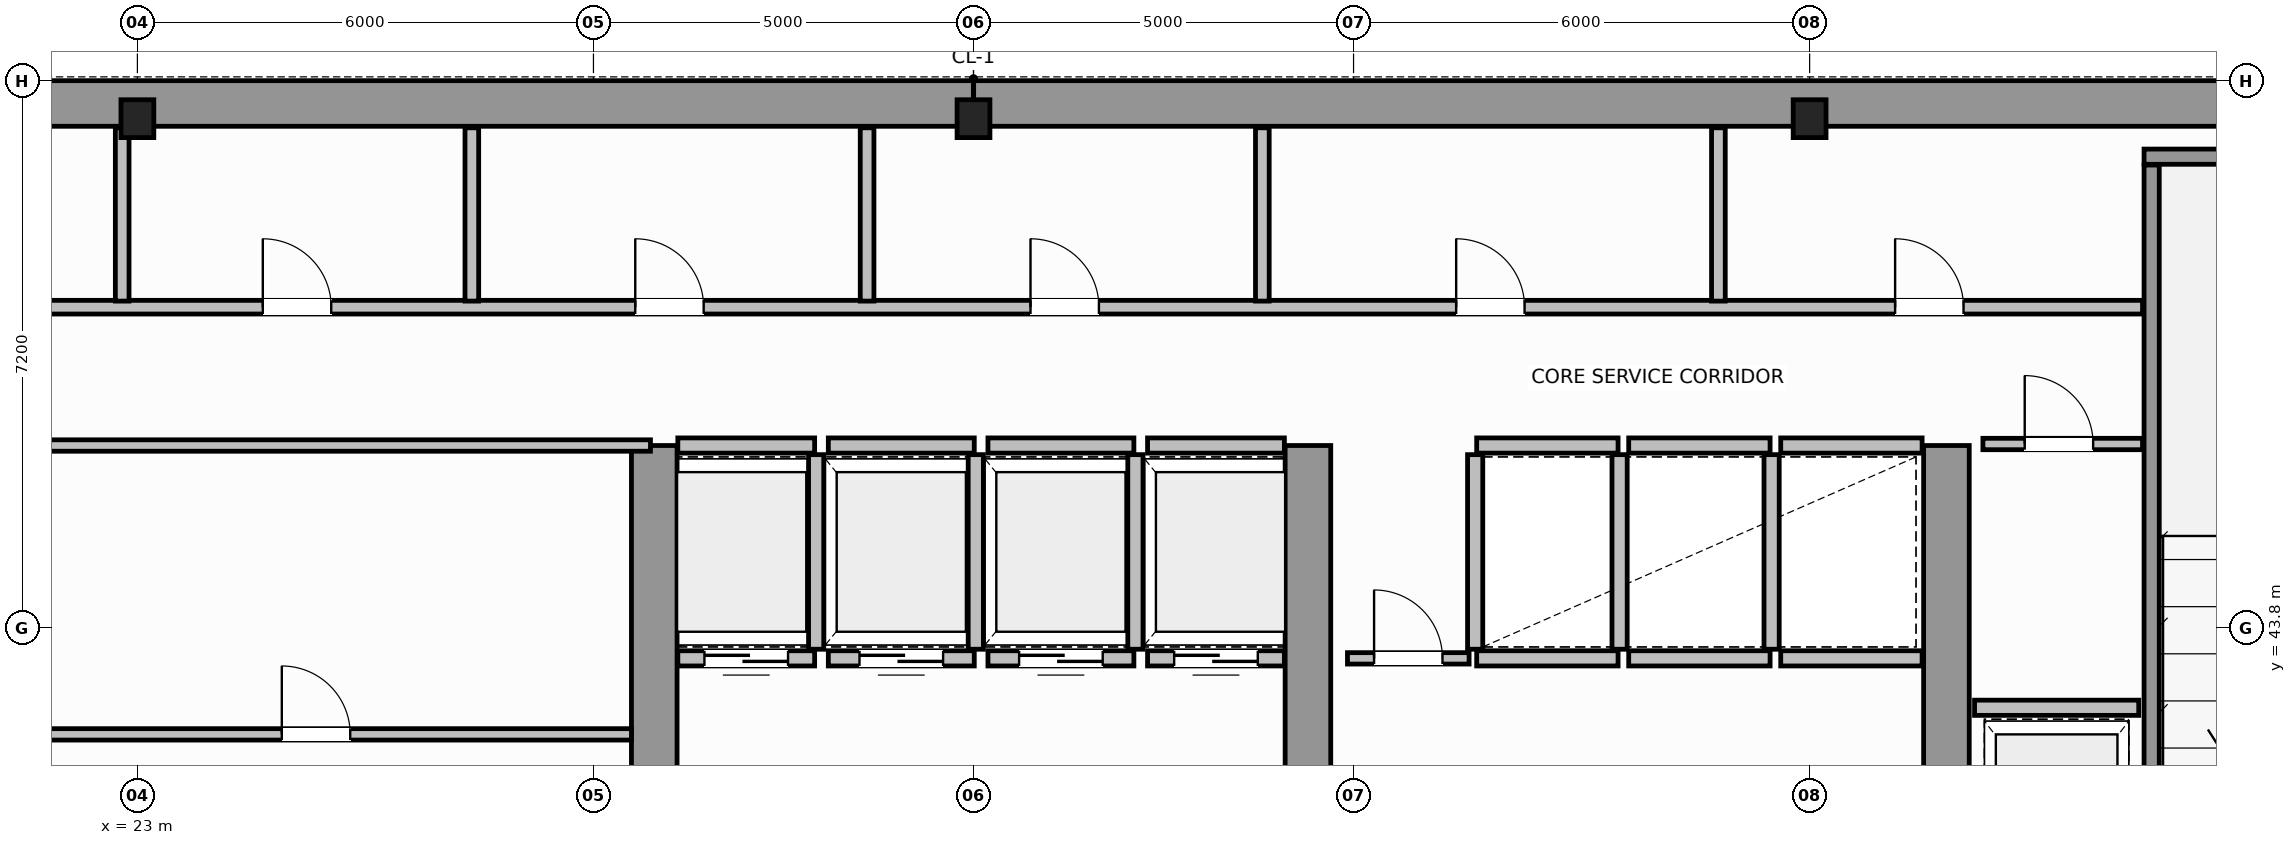
"""IFC4 building model, lengths in metres.
Left out: names, types, materials, properties, quantities, classifications, styles, units other than length and angle.
Written with IfcOpenShell. Run it as: python <this file> out.ifc"""

import sys

from ifc_helpers import new_model, si_unit, direction, frame, frame_2d, origin, origin_2d, place, context, subcontext, project, spatial, rectangle, i_section, extrude, source, transform, mapped, element, fill, save


model = new_model("IFC4")
c1 = context("Model", 3, precision=1e-05, world=origin(), true_north=direction((0.0, 1.0)))
c2 = subcontext(c1, "Body", "Model", "MODEL_VIEW")
j1 = project(units=[si_unit("LENGTHUNIT", "METRE"), si_unit("PLANEANGLEUNIT", "RADIAN")], contexts=[c1])
p1 = place(None, origin())
s1 = spatial("IfcSite", under=j1, at=p1, CompositionType="ELEMENT")
p2 = place(p1, origin())
s2 = spatial("IfcBuilding", under=s1, at=p2, CompositionType="ELEMENT")
p3 = place(p2, frame((0.0, 0.0, 172.8)))
s3 = spatial("IfcBuildingStorey", under=s2, at=p3, CompositionType="ELEMENT", Elevation=172.8)
m1 = source(origin(), c2, "Body", "SweptSolid", [
    extrude(i_section(OverallWidth=0.432, OverallDepth=0.498, WebThickness=0.055, FlangeThickness=0.068, FilletRadius=0.015, at=origin_2d()), origin(), (0.0, 0.0, 1.0), 3.8),
])
for number, where, z_axis, x_axis in (
    (1, (23.0, 50.5, 0.0), (0.0, 0.0, 1.0), (1.0, 0.0, 0.0)),
    (2, (34.0, 50.5, 0.0), (0.0, 0.0, 1.0), (1.0, 0.0, 0.0)),
    (3, (45.0, 50.5, 0.0), (0.0, 0.0, 1.0), (1.0, 0.0, 0.0)),
):
    element("IfcColumn", number, at=place(p3, frame(where, z_axis=z_axis, x_axis=x_axis)), inside=s3, PredefinedType="COLUMN", context=c2, shape_type="MappedRepresentation", body=[
        mapped(m1, transform((0.0, 0.0, 0.0), scale=1.0)),
    ])
for number, where, z_axis, x_axis in (
    (4, (14.304, 50.7, 0.0), (0.0, 0.0, 1.0), (1.0, 0.0, 0.0)),
    (5, (34.002, 50.7, 0.0), (0.0, 0.0, 1.0), (1.0, 0.0, 0.0)),
):
    element("IfcWall", number, at=place(p3, frame(where, z_axis=z_axis, x_axis=x_axis)), inside=s3, PredefinedType="SHEAR", context=c2, shape_type="SweptSolid", body=[
        extrude(rectangle(XDim=19.694, YDim=0.6, at=frame_2d((9.847, 0.0))), origin(), (0.0, 0.0, 1.0), 3.8),
    ])
for number, where, z_axis, x_axis in (
    (6, (29.8, 36.82, 0.0), (0.0, 0.0, 1.0), (0.0, 1.0, 0.0)),
    (7, (38.4, 36.82, 0.0), (0.0, 0.0, 1.0), (0.0, 1.0, 0.0)),
    (8, (46.8, 36.82, 0.0), (0.0, 0.0, 1.0), (0.0, 1.0, 0.0)),
):
    element("IfcWall", number, at=place(p3, frame(where, z_axis=z_axis, x_axis=x_axis)), inside=s3, PredefinedType="SHEAR", context=c2, shape_type="SweptSolid", body=[
        extrude(rectangle(XDim=9.38, YDim=0.6, at=frame_2d((4.69, 0.0))), origin(), (0.0, 0.0, 1.0), 3.8),
    ])
p4 = place(p3, frame((49.4, 50.0, 0.0), z_axis=(0.0, 0.0, 1.0), x_axis=(1.0, 0.0, 0.0)))
e9 = element("IfcWall", 9, at=p4, inside=s3, PredefinedType="SOLIDWALL", context=c2, shape_type="SweptSolid", body=[
    extrude(rectangle(XDim=4.3, YDim=0.2, at=frame_2d((2.15, 0.0))), origin(), (0.0, 0.0, 1.0), 3.8),
])
p5 = place(p3, frame((49.5, 39.96, 0.0), z_axis=(0.0, 0.0, 1.0), x_axis=(0.0, 1.0, 0.0)))
e10 = element("IfcWall", 10, at=p5, inside=s3, PredefinedType="SOLIDWALL", context=c2, shape_type="SweptSolid", body=[
    extrude(rectangle(XDim=9.93, YDim=0.2, at=frame_2d((4.965, 0.0))), origin(), (0.0, 0.0, 1.0), 3.8),
])
p6 = place(p3, frame((30.11, 43.4, 0.0), z_axis=(0.0, 0.0, 1.0), x_axis=(1.0, 0.0, 0.0)))
e11 = element("IfcWall", 11, at=p6, inside=s3, PredefinedType="SOLIDWALL", context=c2, shape_type="SweptSolid", body=[
    extrude(rectangle(XDim=1.8, YDim=0.2, at=frame_2d((0.9, 0.0))), origin(), (0.0, 0.0, 1.0), 3.58),
])
p7 = place(p6, frame((0.35, 0.0, 0.0)))
e12 = element("IfcOpeningElement", 12, at=p7, cuts=e11, PredefinedType="OPENING", context=c2, shape_type="SweptSolid", body=[
    extrude(rectangle(XDim=1.1, YDim=2.15, at=frame_2d((0.55, 1.075))), frame((0.0, 0.11, 0.0), z_axis=(0.0, -1.0, 0.0), x_axis=(1.0, 0.0, 0.0)), (0.0, 0.0, 1.0), 0.22),
])
p8 = place(p3, frame((30.11, 46.2, 0.0), z_axis=(0.0, 0.0, 1.0), x_axis=(1.0, 0.0, 0.0)))
e13 = element("IfcWall", 13, at=p8, inside=s3, PredefinedType="SOLIDWALL", context=c2, shape_type="SweptSolid", body=[
    extrude(rectangle(XDim=1.8, YDim=0.2, at=frame_2d((0.9, 0.0))), origin(), (0.0, 0.0, 1.0), 3.58),
])
p9 = place(p3, frame((31.93, 43.52, 0.0), z_axis=(0.0, 0.0, 1.0), x_axis=(0.0, 1.0, 0.0)))
e14 = element("IfcWall", 14, at=p9, inside=s3, PredefinedType="SOLIDWALL", context=c2, shape_type="SweptSolid", body=[
    extrude(rectangle(XDim=2.56, YDim=0.2, at=frame_2d((1.28, 0.0))), origin(), (0.0, 0.0, 1.0), 3.58),
])
p10 = place(p3, frame((32.09, 43.4, 0.0), z_axis=(0.0, 0.0, 1.0), x_axis=(1.0, 0.0, 0.0)))
e15 = element("IfcWall", 15, at=p10, inside=s3, PredefinedType="SOLIDWALL", context=c2, shape_type="SweptSolid", body=[
    extrude(rectangle(XDim=1.92, YDim=0.2, at=frame_2d((0.96, 0.0))), origin(), (0.0, 0.0, 1.0), 3.58),
])
p11 = place(p10, frame((0.41, 0.0, 0.0)))
e16 = element("IfcOpeningElement", 16, at=p11, cuts=e15, PredefinedType="OPENING", context=c2, shape_type="SweptSolid", body=[
    extrude(rectangle(XDim=1.1, YDim=2.15, at=frame_2d((0.55, 1.075))), frame((0.0, 0.11, 0.0), z_axis=(0.0, -1.0, 0.0), x_axis=(1.0, 0.0, 0.0)), (0.0, 0.0, 1.0), 0.22),
])
p12 = place(p3, frame((32.09, 46.2, 0.0), z_axis=(0.0, 0.0, 1.0), x_axis=(1.0, 0.0, 0.0)))
e17 = element("IfcWall", 17, at=p12, inside=s3, PredefinedType="SOLIDWALL", context=c2, shape_type="SweptSolid", body=[
    extrude(rectangle(XDim=1.92, YDim=0.2, at=frame_2d((0.96, 0.0))), origin(), (0.0, 0.0, 1.0), 3.58),
])
p13 = place(p3, frame((34.03, 43.52, 0.0), z_axis=(0.0, 0.0, 1.0), x_axis=(0.0, 1.0, 0.0)))
e18 = element("IfcWall", 18, at=p13, inside=s3, PredefinedType="SOLIDWALL", context=c2, shape_type="SweptSolid", body=[
    extrude(rectangle(XDim=2.56, YDim=0.2, at=frame_2d((1.28, 0.0))), origin(), (0.0, 0.0, 1.0), 3.58),
])
p14 = place(p3, frame((34.19, 43.4, 0.0), z_axis=(0.0, 0.0, 1.0), x_axis=(1.0, 0.0, 0.0)))
e19 = element("IfcWall", 19, at=p14, inside=s3, PredefinedType="SOLIDWALL", context=c2, shape_type="SweptSolid", body=[
    extrude(rectangle(XDim=1.92, YDim=0.2, at=frame_2d((0.96, 0.0))), origin(), (0.0, 0.0, 1.0), 3.58),
])
p15 = place(p14, frame((0.41, 0.0, 0.0)))
e20 = element("IfcOpeningElement", 20, at=p15, cuts=e19, PredefinedType="OPENING", context=c2, shape_type="SweptSolid", body=[
    extrude(rectangle(XDim=1.1, YDim=2.15, at=frame_2d((0.55, 1.075))), frame((0.0, 0.11, 0.0), z_axis=(0.0, -1.0, 0.0), x_axis=(1.0, 0.0, 0.0)), (0.0, 0.0, 1.0), 0.22),
])
p16 = place(p3, frame((34.19, 46.2, 0.0), z_axis=(0.0, 0.0, 1.0), x_axis=(1.0, 0.0, 0.0)))
e21 = element("IfcWall", 21, at=p16, inside=s3, PredefinedType="SOLIDWALL", context=c2, shape_type="SweptSolid", body=[
    extrude(rectangle(XDim=1.92, YDim=0.2, at=frame_2d((0.96, 0.0))), origin(), (0.0, 0.0, 1.0), 3.58),
])
p17 = place(p3, frame((36.13, 43.52, 0.0), z_axis=(0.0, 0.0, 1.0), x_axis=(0.0, 1.0, 0.0)))
e22 = element("IfcWall", 22, at=p17, inside=s3, PredefinedType="SOLIDWALL", context=c2, shape_type="SweptSolid", body=[
    extrude(rectangle(XDim=2.56, YDim=0.2, at=frame_2d((1.28, 0.0))), origin(), (0.0, 0.0, 1.0), 3.58),
])
p18 = place(p3, frame((36.29, 43.4, 0.0), z_axis=(0.0, 0.0, 1.0), x_axis=(1.0, 0.0, 0.0)))
e23 = element("IfcWall", 23, at=p18, inside=s3, PredefinedType="SOLIDWALL", context=c2, shape_type="SweptSolid", body=[
    extrude(rectangle(XDim=1.8, YDim=0.2, at=frame_2d((0.9, 0.0))), origin(), (0.0, 0.0, 1.0), 3.58),
])
p19 = place(p18, frame((0.35, 0.0, 0.0)))
e24 = element("IfcOpeningElement", 24, at=p19, cuts=e23, PredefinedType="OPENING", context=c2, shape_type="SweptSolid", body=[
    extrude(rectangle(XDim=1.1, YDim=2.15, at=frame_2d((0.55, 1.075))), frame((0.0, 0.11, 0.0), z_axis=(0.0, -1.0, 0.0), x_axis=(1.0, 0.0, 0.0)), (0.0, 0.0, 1.0), 0.22),
])
p20 = place(p3, frame((36.29, 46.2, 0.0), z_axis=(0.0, 0.0, 1.0), x_axis=(1.0, 0.0, 0.0)))
e25 = element("IfcWall", 25, at=p20, inside=s3, PredefinedType="SOLIDWALL", context=c2, shape_type="SweptSolid", body=[
    extrude(rectangle(XDim=1.8, YDim=0.2, at=frame_2d((0.9, 0.0))), origin(), (0.0, 0.0, 1.0), 3.58),
])
for number, where, z_axis, x_axis in (
    (26, (40.62, 43.4, 0.0), (0.0, 0.0, 1.0), (1.0, 0.0, 0.0)),
    (27, (40.62, 46.2, 0.0), (0.0, 0.0, 1.0), (1.0, 0.0, 0.0)),
):
    element("IfcWall", number, at=place(p3, frame(where, z_axis=z_axis, x_axis=x_axis)), inside=s3, PredefinedType="SOLIDWALL", context=c2, shape_type="SweptSolid", body=[
        extrude(rectangle(XDim=1.86, YDim=0.2, at=frame_2d((0.93, 0.0))), origin(), (0.0, 0.0, 1.0), 3.58),
    ])
for number, where, z_axis, x_axis in (
    (28, (40.6, 43.52, 0.0), (0.0, 0.0, 1.0), (0.0, 1.0, 0.0)),
    (29, (42.5, 43.52, 0.0), (0.0, 0.0, 1.0), (0.0, 1.0, 0.0)),
):
    element("IfcWall", number, at=place(p3, frame(where, z_axis=z_axis, x_axis=x_axis)), inside=s3, PredefinedType="SOLIDWALL", context=c2, shape_type="SweptSolid", body=[
        extrude(rectangle(XDim=2.56, YDim=0.2, at=frame_2d((1.28, 0.0))), origin(), (0.0, 0.0, 1.0), 3.58),
    ])
for number, where, z_axis, x_axis in (
    (30, (42.62, 43.4, 0.0), (0.0, 0.0, 1.0), (1.0, 0.0, 0.0)),
    (31, (42.62, 46.2, 0.0), (0.0, 0.0, 1.0), (1.0, 0.0, 0.0)),
):
    element("IfcWall", number, at=place(p3, frame(where, z_axis=z_axis, x_axis=x_axis)), inside=s3, PredefinedType="SOLIDWALL", context=c2, shape_type="SweptSolid", body=[
        extrude(rectangle(XDim=1.86, YDim=0.2, at=frame_2d((0.93, 0.0))), origin(), (0.0, 0.0, 1.0), 3.58),
    ])
p21 = place(p3, frame((44.5, 43.52, 0.0), z_axis=(0.0, 0.0, 1.0), x_axis=(0.0, 1.0, 0.0)))
e32 = element("IfcWall", 32, at=p21, inside=s3, PredefinedType="SOLIDWALL", context=c2, shape_type="SweptSolid", body=[
    extrude(rectangle(XDim=2.56, YDim=0.2, at=frame_2d((1.28, 0.0))), origin(), (0.0, 0.0, 1.0), 3.58),
])
for number, where, z_axis, x_axis in (
    (33, (44.62, 43.4, 0.0), (0.0, 0.0, 1.0), (1.0, 0.0, 0.0)),
    (34, (44.62, 46.2, 0.0), (0.0, 0.0, 1.0), (1.0, 0.0, 0.0)),
):
    element("IfcWall", number, at=place(p3, frame(where, z_axis=z_axis, x_axis=x_axis)), inside=s3, PredefinedType="SOLIDWALL", context=c2, shape_type="SweptSolid", body=[
        extrude(rectangle(XDim=1.86, YDim=0.2, at=frame_2d((0.93, 0.0))), origin(), (0.0, 0.0, 1.0), 3.58),
    ])
p22 = place(p3, frame((47.17, 42.75, 0.0), z_axis=(0.0, 0.0, 1.0), x_axis=(1.0, 0.0, 0.0)))
e35 = element("IfcWall", 35, at=p22, inside=s3, PredefinedType="SOLIDWALL", context=c2, shape_type="SweptSolid", body=[
    extrude(rectangle(XDim=2.16, YDim=0.2, at=frame_2d((1.08, 0.0))), origin(), (0.0, 0.0, 1.0), 3.58),
])
p23 = place(p3, frame((21.25, 46.2, 0.0), z_axis=(0.0, 0.0, 1.0), x_axis=(1.0, 0.0, 0.0)))
e36 = element("IfcWall", 36, at=p23, inside=s3, PredefinedType="PARTITIONING", context=c2, shape_type="SweptSolid", body=[
    extrude(rectangle(XDim=8.5, YDim=0.15, at=frame_2d((4.25, 0.0))), origin(), (0.0, 0.0, 1.0), 3.58),
])
p24 = place(p3, frame((21.5, 42.4, 0.0), z_axis=(0.0, 0.0, 1.0), x_axis=(1.0, 0.0, 0.0)))
e37 = element("IfcWall", 37, at=p24, inside=s3, PredefinedType="PARTITIONING", context=c2, shape_type="SweptSolid", body=[
    extrude(rectangle(XDim=8.0, YDim=0.15, at=frame_2d((4.0, 0.0))), origin(), (0.0, 0.0, 1.0), 3.58),
])
p25 = place(p24, frame((3.4, 0.0, 0.0)))
e38 = element("IfcOpeningElement", 38, at=p25, cuts=e37, PredefinedType="OPENING", context=c2, shape_type="SweptSolid", body=[
    extrude(rectangle(XDim=0.9, YDim=2.1, at=frame_2d((0.45, 1.05))), frame((0.0, 0.085, 0.0), z_axis=(0.0, -1.0, 0.0), x_axis=(1.0, 0.0, 0.0)), (0.0, 0.0, 1.0), 0.17),
])
p26 = place(p3, frame((47.28, 46.22, 0.0), z_axis=(0.0, 0.0, 1.0), x_axis=(1.0, 0.0, 0.0)))
e39 = element("IfcWall", 39, at=p26, inside=s3, PredefinedType="PARTITIONING", context=c2, shape_type="SweptSolid", body=[
    extrude(rectangle(XDim=2.1, YDim=0.15, at=frame_2d((1.05, 0.0))), origin(), (0.0, 0.0, 1.0), 3.58),
])
p27 = place(p26, frame((0.55, 0.0, 0.0)))
e40 = element("IfcOpeningElement", 40, at=p27, cuts=e39, PredefinedType="OPENING", context=c2, shape_type="SweptSolid", body=[
    extrude(rectangle(XDim=0.9, YDim=2.1, at=frame_2d((0.45, 1.05))), frame((0.0, 0.085, 0.0), z_axis=(0.0, -1.0, 0.0), x_axis=(1.0, 0.0, 0.0)), (0.0, 0.0, 1.0), 0.17),
])
p28 = place(p3, frame((38.92, 43.4, 0.0), z_axis=(0.0, 0.0, 1.0), x_axis=(1.0, 0.0, 0.0)))
e41 = element("IfcWall", 41, at=p28, inside=s3, PredefinedType="PARTITIONING", context=c2, shape_type="SweptSolid", body=[
    extrude(rectangle(XDim=1.6, YDim=0.15, at=frame_2d((0.8, 0.0))), origin(), (0.0, 0.0, 1.0), 3.58),
])
p29 = place(p28, frame((0.35, 0.0, 0.0)))
e42 = element("IfcOpeningElement", 42, at=p29, cuts=e41, PredefinedType="OPENING", context=c2, shape_type="SweptSolid", body=[
    extrude(rectangle(XDim=0.9, YDim=2.1, at=frame_2d((0.45, 1.05))), frame((0.0, 0.085, 0.0), z_axis=(0.0, -1.0, 0.0), x_axis=(1.0, 0.0, 0.0)), (0.0, 0.0, 1.0), 0.17),
])
p30 = place(p3, frame((18.62, 48.02, 0.0), z_axis=(0.0, 0.0, 1.0), x_axis=(1.0, 0.0, 0.0)))
e43 = element("IfcWall", 43, at=p30, inside=s3, PredefinedType="PLUMBINGWALL", context=c2, shape_type="SweptSolid", body=[
    extrude(rectangle(XDim=30.76, YDim=0.18, at=frame_2d((15.38, 0.0))), origin(), (0.0, 0.0, 1.0), 3.58),
])
p31 = place(p30, frame((1.655, 0.0, 0.0)))
e44 = element("IfcOpeningElement", 44, at=p31, cuts=e43, PredefinedType="OPENING", context=c2, shape_type="SweptSolid", body=[
    extrude(rectangle(XDim=0.9, YDim=2.15, at=frame_2d((0.45, 1.075))), frame((0.0, 0.1, 0.0), z_axis=(0.0, -1.0, 0.0), x_axis=(1.0, 0.0, 0.0)), (0.0, 0.0, 1.0), 0.2),
])
p32 = place(p30, frame((6.03, 0.0, 0.0)))
e45 = element("IfcOpeningElement", 45, at=p32, cuts=e43, PredefinedType="OPENING", context=c2, shape_type="SweptSolid", body=[
    extrude(rectangle(XDim=0.9, YDim=2.15, at=frame_2d((0.45, 1.075))), frame((0.0, 0.1, 0.0), z_axis=(0.0, -1.0, 0.0), x_axis=(1.0, 0.0, 0.0)), (0.0, 0.0, 1.0), 0.2),
])
p33 = place(p30, frame((10.93, 0.0, 0.0)))
e46 = element("IfcOpeningElement", 46, at=p33, cuts=e43, PredefinedType="OPENING", context=c2, shape_type="SweptSolid", body=[
    extrude(rectangle(XDim=0.9, YDim=2.15, at=frame_2d((0.45, 1.075))), frame((0.0, 0.1, 0.0), z_axis=(0.0, -1.0, 0.0), x_axis=(1.0, 0.0, 0.0)), (0.0, 0.0, 1.0), 0.2),
])
p34 = place(p30, frame((16.13, 0.0, 0.0)))
e47 = element("IfcOpeningElement", 47, at=p34, cuts=e43, PredefinedType="OPENING", context=c2, shape_type="SweptSolid", body=[
    extrude(rectangle(XDim=0.9, YDim=2.15, at=frame_2d((0.45, 1.075))), frame((0.0, 0.1, 0.0), z_axis=(0.0, -1.0, 0.0), x_axis=(1.0, 0.0, 0.0)), (0.0, 0.0, 1.0), 0.2),
])
p35 = place(p30, frame((21.73, 0.0, 0.0)))
e48 = element("IfcOpeningElement", 48, at=p35, cuts=e43, PredefinedType="OPENING", context=c2, shape_type="SweptSolid", body=[
    extrude(rectangle(XDim=0.9, YDim=2.15, at=frame_2d((0.45, 1.075))), frame((0.0, 0.1, 0.0), z_axis=(0.0, -1.0, 0.0), x_axis=(1.0, 0.0, 0.0)), (0.0, 0.0, 1.0), 0.2),
])
p36 = place(p30, frame((27.505, 0.0, 0.0)))
e49 = element("IfcOpeningElement", 49, at=p36, cuts=e43, PredefinedType="OPENING", context=c2, shape_type="SweptSolid", body=[
    extrude(rectangle(XDim=0.9, YDim=2.15, at=frame_2d((0.45, 1.075))), frame((0.0, 0.1, 0.0), z_axis=(0.0, -1.0, 0.0), x_axis=(1.0, 0.0, 0.0)), (0.0, 0.0, 1.0), 0.2),
])
p37 = place(p3, frame((22.8, 48.1, 0.0), z_axis=(0.0, 0.0, 1.0), x_axis=(0.0, 1.0, 0.0)))
e50 = element("IfcWall", 50, at=p37, inside=s3, PredefinedType="PLUMBINGWALL", context=c2, shape_type="SweptSolid", body=[
    extrude(rectangle(XDim=2.28, YDim=0.18, at=frame_2d((1.14, 0.0))), origin(), (0.0, 0.0, 1.0), 2.97),
])
for number, where, z_axis, x_axis in (
    (51, (27.4, 48.1, 0.0), (0.0, 0.0, 1.0), (0.0, 1.0, 0.0)),
    (52, (32.6, 48.1, 0.0), (0.0, 0.0, 1.0), (0.0, 1.0, 0.0)),
    (53, (37.8, 48.1, 0.0), (0.0, 0.0, 1.0), (0.0, 1.0, 0.0)),
    (54, (43.8, 48.1, 0.0), (0.0, 0.0, 1.0), (0.0, 1.0, 0.0)),
):
    element("IfcWall", number, at=place(p3, frame(where, z_axis=z_axis, x_axis=x_axis)), inside=s3, PredefinedType="PLUMBINGWALL", context=c2, shape_type="SweptSolid", body=[
        extrude(rectangle(XDim=2.28, YDim=0.18, at=frame_2d((1.14, 0.0))), origin(), (0.0, 0.0, 1.0), 3.58),
    ])
m2 = source(origin(), c2, "Body", "SweptSolid", [
    extrude(rectangle(XDim=1.1, YDim=2.15, at=frame_2d((0.55, 1.075))), frame((0.0, 0.025, 0.0), z_axis=(0.0, -1.0, 0.0), x_axis=(1.0, 0.0, 0.0)), (0.0, 0.0, 1.0), 0.05),
])
p38 = place(p7, origin())
e55 = element("IfcDoor", 55, at=p38, inside=s3, OperationType="DOUBLE_DOOR_SLIDING", PredefinedType="DOOR", context=c2, shape_type="MappedRepresentation", body=[
    mapped(m2, transform((0.0, 0.0, 0.0), scale=1.0)),
])
fill(e12, e55)
p39 = place(p11, origin())
e56 = element("IfcDoor", 56, at=p39, inside=s3, OperationType="DOUBLE_DOOR_SLIDING", PredefinedType="DOOR", context=c2, shape_type="MappedRepresentation", body=[
    mapped(m2, transform((0.0, 0.0, 0.0), scale=1.0)),
])
fill(e16, e56)
p40 = place(p15, origin())
e57 = element("IfcDoor", 57, at=p40, inside=s3, OperationType="DOUBLE_DOOR_SLIDING", PredefinedType="DOOR", context=c2, shape_type="MappedRepresentation", body=[
    mapped(m2, transform((0.0, 0.0, 0.0), scale=1.0)),
])
fill(e20, e57)
p41 = place(p19, origin())
e58 = element("IfcDoor", 58, at=p41, inside=s3, OperationType="DOUBLE_DOOR_SLIDING", PredefinedType="DOOR", context=c2, shape_type="MappedRepresentation", body=[
    mapped(m2, transform((0.0, 0.0, 0.0), scale=1.0)),
])
fill(e24, e58)
m3 = source(origin(), c2, "Body", "SweptSolid", [
    extrude(rectangle(XDim=0.9, YDim=2.1, at=frame_2d((0.45, 1.05))), frame((0.0, 0.025, 0.0), z_axis=(0.0, -1.0, 0.0), x_axis=(1.0, 0.0, 0.0)), (0.0, 0.0, 1.0), 0.05),
])
p42 = place(p25, origin())
e59 = element("IfcDoor", 59, at=p42, inside=s3, OperationType="SINGLE_SWING_RIGHT", PredefinedType="DOOR", context=c2, shape_type="MappedRepresentation", body=[
    mapped(m3, transform((0.0, 0.0, 0.0), scale=1.0)),
])
fill(e38, e59)
p43 = place(p27, origin())
e60 = element("IfcDoor", 60, at=p43, inside=s3, OperationType="SINGLE_SWING_RIGHT", PredefinedType="DOOR", context=c2, shape_type="MappedRepresentation", body=[
    mapped(m3, transform((0.0, 0.0, 0.0), scale=1.0)),
])
fill(e40, e60)
p44 = place(p29, origin())
e61 = element("IfcDoor", 61, at=p44, inside=s3, OperationType="SINGLE_SWING_LEFT", PredefinedType="DOOR", context=c2, shape_type="MappedRepresentation", body=[
    mapped(m3, transform((0.0, 0.0, 0.0), scale=1.0)),
])
fill(e42, e61)
m4 = source(origin(), c2, "Body", "SweptSolid", [
    extrude(rectangle(XDim=0.9, YDim=2.15, at=frame_2d((0.45, 1.075))), frame((0.0, 0.025, 0.0), z_axis=(0.0, -1.0, 0.0), x_axis=(1.0, 0.0, 0.0)), (0.0, 0.0, 1.0), 0.05),
])
p45 = place(p32, origin())
e62 = element("IfcDoor", 62, at=p45, inside=s3, OperationType="SINGLE_SWING_RIGHT", PredefinedType="DOOR", context=c2, shape_type="MappedRepresentation", body=[
    mapped(m4, transform((0.0, 0.0, 0.0), scale=1.0)),
])
fill(e45, e62)
p46 = place(p33, origin())
e63 = element("IfcDoor", 63, at=p46, inside=s3, OperationType="SINGLE_SWING_LEFT", PredefinedType="DOOR", context=c2, shape_type="MappedRepresentation", body=[
    mapped(m4, transform((0.0, 0.0, 0.0), scale=1.0)),
])
fill(e46, e63)
p47 = place(p34, origin())
e64 = element("IfcDoor", 64, at=p47, inside=s3, OperationType="SINGLE_SWING_RIGHT", PredefinedType="DOOR", context=c2, shape_type="MappedRepresentation", body=[
    mapped(m4, transform((0.0, 0.0, 0.0), scale=1.0)),
])
fill(e47, e64)
p48 = place(p35, origin())
e65 = element("IfcDoor", 65, at=p48, inside=s3, OperationType="SINGLE_SWING_LEFT", PredefinedType="DOOR", context=c2, shape_type="MappedRepresentation", body=[
    mapped(m4, transform((0.0, 0.0, 0.0), scale=1.0)),
])
fill(e48, e65)
p49 = place(p36, origin())
e66 = element("IfcDoor", 66, at=p49, inside=s3, OperationType="SINGLE_SWING_RIGHT", PredefinedType="DOOR", context=c2, shape_type="MappedRepresentation", body=[
    mapped(m4, transform((0.0, 0.0, 0.0), scale=1.0)),
])
fill(e49, e66)
save(model, sys.argv[1])
